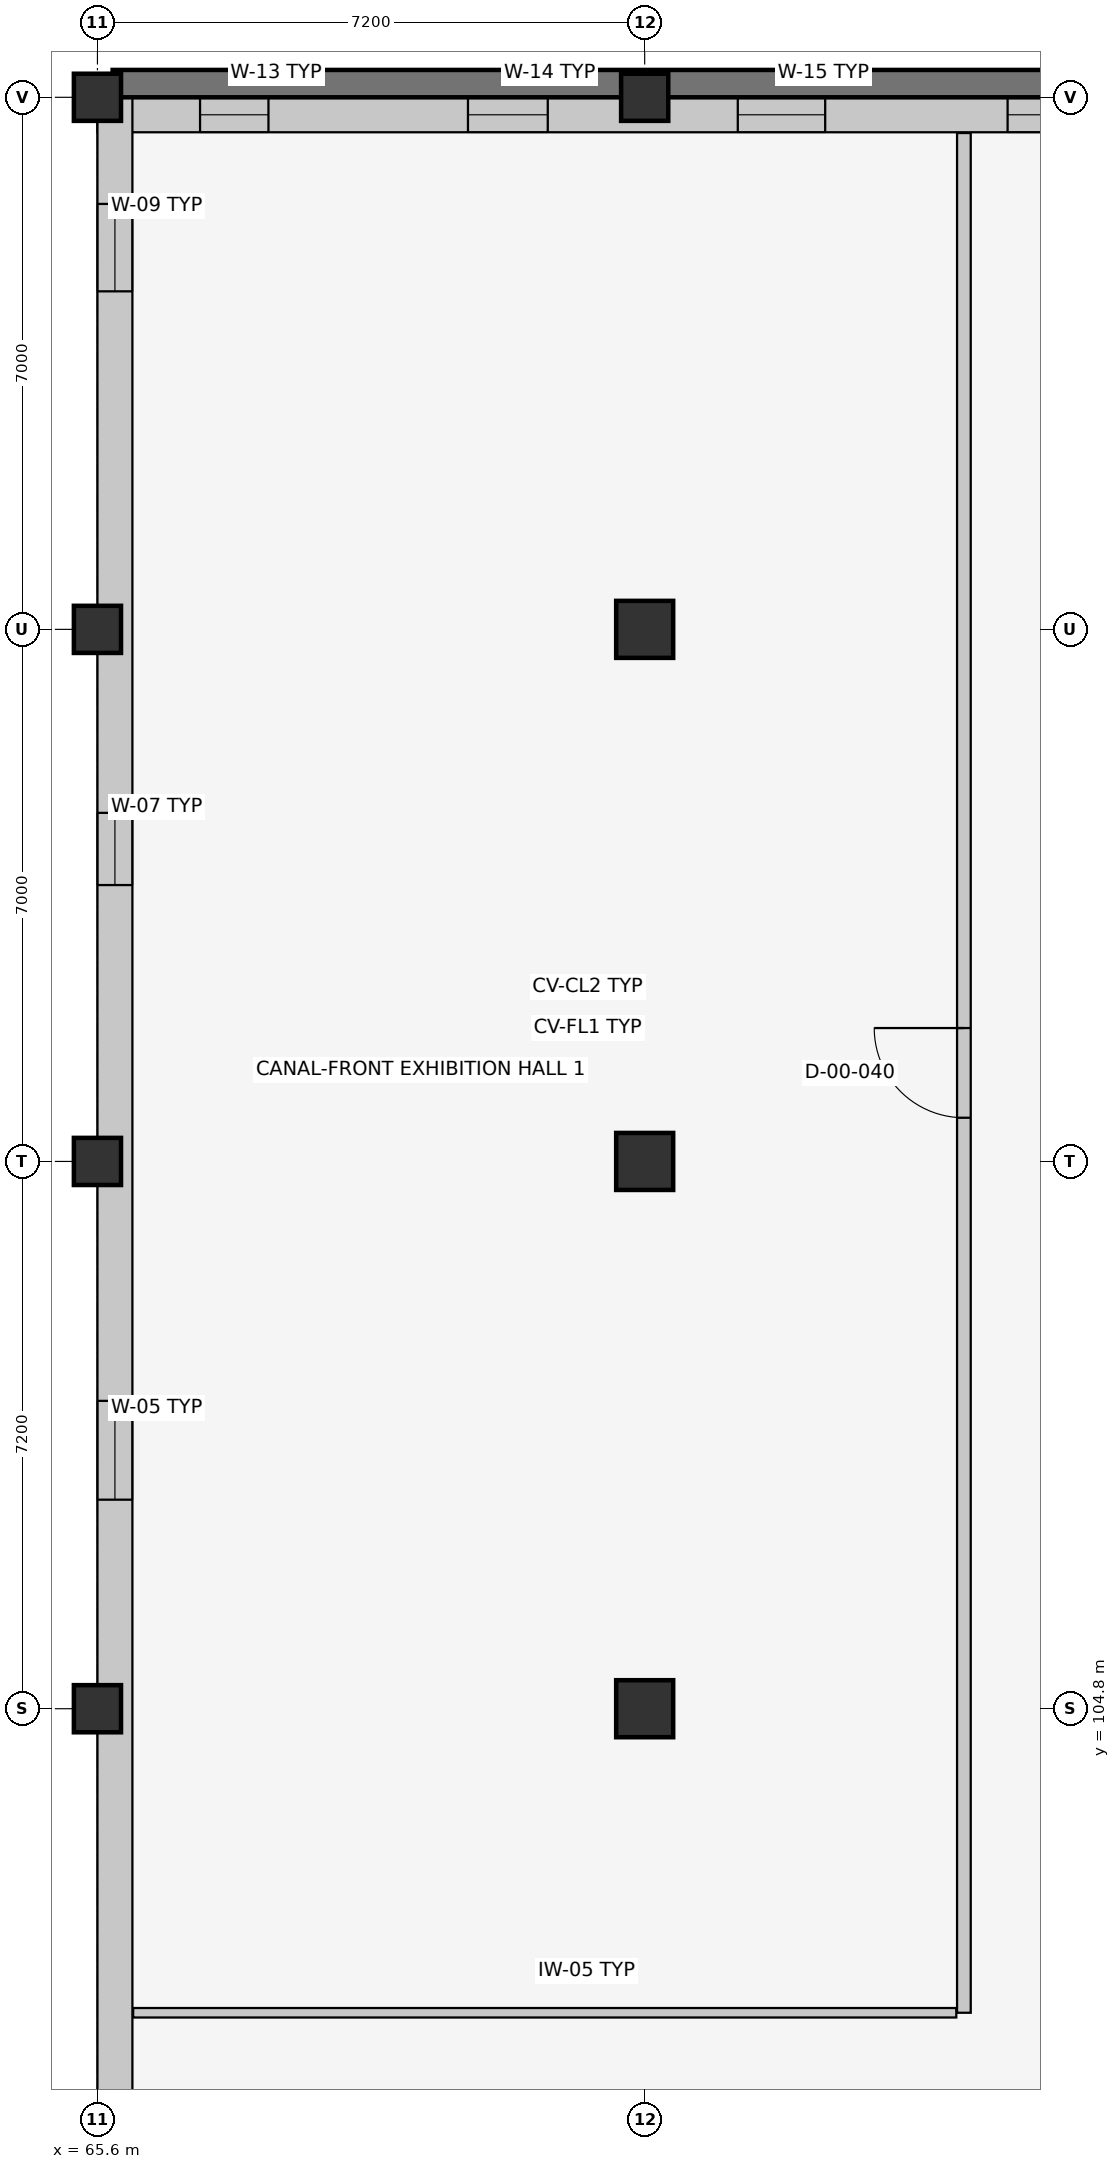
"""IFC4 building model, lengths in metres.
Left out: names, types, materials, properties, quantities, classifications, styles, units other than length and angle.
Written with IfcOpenShell. Run it as: python <this file> out.ifc"""

import sys

from ifc_helpers import new_model, si_unit, direction, frame, frame_2d, origin, origin_2d, place, context, subcontext, project, spatial, rectangle, circle, extrude, element, fill, save


model = new_model("IFC4")
c1 = context("Model", 3, precision=1e-05, world=origin(), true_north=direction((0.0, 1.0)))
c2 = subcontext(c1, "Body", "Model", "MODEL_VIEW")
j1 = project(units=[si_unit("LENGTHUNIT", "METRE"), si_unit("PLANEANGLEUNIT", "RADIAN")], contexts=[c1])
p1 = place(None, origin())
s1 = spatial("IfcSite", under=j1, at=p1, CompositionType="ELEMENT")
p2 = place(p1, origin())
s2 = spatial("IfcBuilding", under=s1, at=p2, CompositionType="ELEMENT")
p3 = place(p2, origin())
s3 = spatial("IfcBuildingStorey", under=s2, at=p3, CompositionType="ELEMENT", Elevation=0.0)
for number, where, z_axis, x_axis in (
    (1, (65.6, 104.8, 0.0), (0.0, 0.0, 1.0), (1.0, 0.0, 0.0)),
    (2, (65.6, 112.0, 0.0), (0.0, 0.0, 1.0), (1.0, 0.0, 0.0)),
    (3, (65.6, 119.0, 0.0), (0.0, 0.0, 1.0), (1.0, 0.0, 0.0)),
    (4, (65.6, 126.0, 0.0), (0.0, 0.0, 1.0), (1.0, 0.0, 0.0)),
):
    element("IfcColumn", number, at=place(p3, frame(where, z_axis=z_axis, x_axis=x_axis)), inside=s3, PredefinedType="COLUMN", context=c2, shape_type="SweptSolid", body=[
        extrude(rectangle(XDim=0.62, YDim=0.62, at=origin_2d()), origin(), (0.0, 0.0, 1.0), 5.4),
    ])
for number, where, z_axis, x_axis in (
    (5, (72.8, 104.8, 0.0), (0.0, 0.0, 1.0), (1.0, 0.0, 0.0)),
    (6, (72.8, 112.0, 0.0), (0.0, 0.0, 1.0), (1.0, 0.0, 0.0)),
    (7, (72.8, 119.0, 0.0), (0.0, 0.0, 1.0), (1.0, 0.0, 0.0)),
):
    element("IfcColumn", number, at=place(p3, frame(where, z_axis=z_axis, x_axis=x_axis)), inside=s3, PredefinedType="COLUMN", context=c2, shape_type="SweptSolid", body=[
        extrude(circle(Radius=0.375, at=origin_2d()), origin(), (0.0, 0.0, 1.0), 5.4),
    ])
p4 = place(p3, frame((72.8, 126.0, 0.0), z_axis=(0.0, 0.0, 1.0), x_axis=(1.0, 0.0, 0.0)))
e8 = element("IfcColumn", 8, at=p4, inside=s3, PredefinedType="COLUMN", context=c2, shape_type="SweptSolid", body=[
    extrude(rectangle(XDim=0.62, YDim=0.62, at=origin_2d()), origin(), (0.0, 0.0, 1.0), 5.4),
])
p5 = place(p3, frame((65.6, 125.77, 0.0), z_axis=(0.0, 0.0, 1.0), x_axis=(1.0, 0.0, 0.0)))
e9 = element("IfcWall", 9, at=p5, inside=s3, PredefinedType="SOLIDWALL", context=c2, shape_type="SweptSolid", body=[
    extrude(rectangle(XDim=43.2, YDim=0.46, at=frame_2d((21.6, 0.0))), origin(), (0.0, 0.0, 1.0), 4.455),
])
p6 = place(p5, frame((16.9, 0.0, 0.0)))
e10 = element("IfcOpeningElement", 10, at=p6, cuts=e9, PredefinedType="OPENING", context=c2, shape_type="SweptSolid", body=[
    extrude(rectangle(XDim=2.2, YDim=2.4, at=frame_2d((1.1, 1.2))), frame((0.0, 0.242, 0.0), z_axis=(0.0, -1.0, 0.0), x_axis=(1.0, 0.0, 0.0)), (0.0, 0.0, 1.0), 0.484),
])
p7 = place(p5, frame((1.35, 0.0, 0.9)))
e11 = element("IfcOpeningElement", 11, at=p7, cuts=e9, PredefinedType="OPENING", context=c2, shape_type="SweptSolid", body=[
    extrude(rectangle(XDim=0.9, YDim=1.6, at=frame_2d((0.45, 0.8))), frame((0.0, 0.242, 0.0), z_axis=(0.0, -1.0, 0.0), x_axis=(1.0, 0.0, 0.0)), (0.0, 0.0, 1.0), 0.484),
])
p8 = place(p5, frame((4.875, 0.0, 0.9)))
e12 = element("IfcOpeningElement", 12, at=p8, cuts=e9, PredefinedType="OPENING", context=c2, shape_type="SweptSolid", body=[
    extrude(rectangle(XDim=1.05, YDim=1.6, at=frame_2d((0.525, 0.8))), frame((0.0, 0.242, 0.0), z_axis=(0.0, -1.0, 0.0), x_axis=(1.0, 0.0, 0.0)), (0.0, 0.0, 1.0), 0.484),
])
p9 = place(p5, frame((8.425, 0.0, 0.9)))
e13 = element("IfcOpeningElement", 13, at=p9, cuts=e9, PredefinedType="OPENING", context=c2, shape_type="SweptSolid", body=[
    extrude(rectangle(XDim=1.15, YDim=1.6, at=frame_2d((0.575, 0.8))), frame((0.0, 0.242, 0.0), z_axis=(0.0, -1.0, 0.0), x_axis=(1.0, 0.0, 0.0)), (0.0, 0.0, 1.0), 0.484),
])
p10 = place(p5, frame((11.975, 0.0, 0.9)))
e14 = element("IfcOpeningElement", 14, at=p10, cuts=e9, PredefinedType="OPENING", context=c2, shape_type="SweptSolid", body=[
    extrude(rectangle(XDim=1.25, YDim=1.6, at=frame_2d((0.625, 0.8))), frame((0.0, 0.242, 0.0), z_axis=(0.0, -1.0, 0.0), x_axis=(1.0, 0.0, 0.0)), (0.0, 0.0, 1.0), 0.484),
])
p11 = place(p5, frame((22.9, 0.0, 0.9)))
e15 = element("IfcOpeningElement", 15, at=p11, cuts=e9, PredefinedType="OPENING", context=c2, shape_type="SweptSolid", body=[
    extrude(rectangle(XDim=1.0, YDim=1.75, at=frame_2d((0.5, 0.875))), frame((0.0, 0.242, 0.0), z_axis=(0.0, -1.0, 0.0), x_axis=(1.0, 0.0, 0.0)), (0.0, 0.0, 1.0), 0.484),
])
p12 = place(p5, frame((26.44, 0.0, 0.9)))
e16 = element("IfcOpeningElement", 16, at=p12, cuts=e9, PredefinedType="OPENING", context=c2, shape_type="SweptSolid", body=[
    extrude(rectangle(XDim=1.12, YDim=1.75, at=frame_2d((0.56, 0.875))), frame((0.0, 0.242, 0.0), z_axis=(0.0, -1.0, 0.0), x_axis=(1.0, 0.0, 0.0)), (0.0, 0.0, 1.0), 0.484),
])
p13 = place(p5, frame((29.98, 0.0, 0.9)))
e17 = element("IfcOpeningElement", 17, at=p13, cuts=e9, PredefinedType="OPENING", context=c2, shape_type="SweptSolid", body=[
    extrude(rectangle(XDim=1.24, YDim=1.75, at=frame_2d((0.62, 0.875))), frame((0.0, 0.242, 0.0), z_axis=(0.0, -1.0, 0.0), x_axis=(1.0, 0.0, 0.0)), (0.0, 0.0, 1.0), 0.484),
])
p14 = place(p5, frame((33.53, 0.0, 0.9)))
e18 = element("IfcOpeningElement", 18, at=p14, cuts=e9, PredefinedType="OPENING", context=c2, shape_type="SweptSolid", body=[
    extrude(rectangle(XDim=1.34, YDim=1.75, at=frame_2d((0.67, 0.875))), frame((0.0, 0.242, 0.0), z_axis=(0.0, -1.0, 0.0), x_axis=(1.0, 0.0, 0.0)), (0.0, 0.0, 1.0), 0.484),
])
p15 = place(p5, frame((37.08, 0.0, 0.9)))
e19 = element("IfcOpeningElement", 19, at=p15, cuts=e9, PredefinedType="OPENING", context=c2, shape_type="SweptSolid", body=[
    extrude(rectangle(XDim=1.44, YDim=1.75, at=frame_2d((0.72, 0.875))), frame((0.0, 0.242, 0.0), z_axis=(0.0, -1.0, 0.0), x_axis=(1.0, 0.0, 0.0)), (0.0, 0.0, 1.0), 0.484),
])
p16 = place(p5, frame((40.65, 0.0, 0.9)))
e20 = element("IfcOpeningElement", 20, at=p16, cuts=e9, PredefinedType="OPENING", context=c2, shape_type="SweptSolid", body=[
    extrude(rectangle(XDim=1.5, YDim=1.75, at=frame_2d((0.75, 0.875))), frame((0.0, 0.242, 0.0), z_axis=(0.0, -1.0, 0.0), x_axis=(1.0, 0.0, 0.0)), (0.0, 0.0, 1.0), 0.484),
])
p17 = place(p3, frame((65.83, 90.4, 0.0), z_axis=(0.0, 0.0, 1.0), x_axis=(0.0, 1.0, 0.0)))
e21 = element("IfcWall", 21, at=p17, inside=s3, PredefinedType="SOLIDWALL", context=c2, shape_type="SweptSolid", body=[
    extrude(rectangle(XDim=35.6, YDim=0.46, at=frame_2d((17.8, 0.0))), origin(), (0.0, 0.0, 1.0), 4.515),
])
p18 = place(p17, frame((2.7, 0.0, 0.0)))
e22 = element("IfcOpeningElement", 22, at=p18, cuts=e21, PredefinedType="OPENING", context=c2, shape_type="SweptSolid", body=[
    extrude(rectangle(XDim=1.8, YDim=2.3, at=frame_2d((0.9, 1.15))), frame((0.0, 0.242, 0.0), z_axis=(0.0, -1.0, 0.0), x_axis=(1.0, 0.0, 0.0)), (0.0, 0.0, 1.0), 0.484),
])
p19 = place(p17, frame((17.15, 0.0, 0.9)))
e23 = element("IfcOpeningElement", 23, at=p19, cuts=e21, PredefinedType="OPENING", context=c2, shape_type="SweptSolid", body=[
    extrude(rectangle(XDim=1.3, YDim=1.35, at=frame_2d((0.65, 0.675))), frame((0.0, 0.242, 0.0), z_axis=(0.0, -1.0, 0.0), x_axis=(1.0, 0.0, 0.0)), (0.0, 0.0, 1.0), 0.484),
])
p20 = place(p17, frame((25.236, 0.0, 0.9)))
e24 = element("IfcOpeningElement", 24, at=p20, cuts=e21, PredefinedType="OPENING", context=c2, shape_type="SweptSolid", body=[
    extrude(rectangle(XDim=0.95, YDim=1.45, at=frame_2d((0.475, 0.725))), frame((0.0, 0.242, 0.0), z_axis=(0.0, -1.0, 0.0), x_axis=(1.0, 0.0, 0.0)), (0.0, 0.0, 1.0), 0.484),
])
p21 = place(p17, frame((33.047, 0.0, 0.9)))
e25 = element("IfcOpeningElement", 25, at=p21, cuts=e21, PredefinedType="OPENING", context=c2, shape_type="SweptSolid", body=[
    extrude(rectangle(XDim=1.15, YDim=1.45, at=frame_2d((0.575, 0.725))), frame((0.0, 0.242, 0.0), z_axis=(0.0, -1.0, 0.0), x_axis=(1.0, 0.0, 0.0)), (0.0, 0.0, 1.0), 0.484),
])
p22 = place(p3, frame((65.8, 126.18, -0.8), z_axis=(0.0, 0.0, 1.0), x_axis=(1.0, 0.0, 0.0)))
e26 = element("IfcWall", 26, at=p22, inside=s3, PredefinedType="USERDEFINED", context=c2, shape_type="SweptSolid", body=[
    extrude(rectangle(XDim=21.4, YDim=0.36, at=frame_2d((10.7, 0.0))), origin(), (0.0, 0.0, 1.0), 1.35),
])
p23 = place(p3, frame((77.0, 100.8, 0.0), z_axis=(0.0, 0.0, 1.0), x_axis=(0.0, 1.0, 0.0)))
e27 = element("IfcWall", 27, at=p23, inside=s3, PredefinedType="PARTITIONING", context=c2, shape_type="SweptSolid", body=[
    extrude(rectangle(XDim=24.73, YDim=0.18, at=frame_2d((12.365, 0.0))), origin(), (0.0, 0.0, 1.0), 5.12),
])
p24 = place(p23, frame((11.775, 0.0, 0.0)))
e28 = element("IfcOpeningElement", 28, at=p24, cuts=e27, PredefinedType="OPENING", context=c2, shape_type="SweptSolid", body=[
    extrude(rectangle(XDim=1.18, YDim=2.2, at=frame_2d((0.59, 1.1))), frame((0.0, 0.102, 0.0), z_axis=(0.0, -1.0, 0.0), x_axis=(1.0, 0.0, 0.0)), (0.0, 0.0, 1.0), 0.204),
])
p25 = place(p3, frame((66.07, 100.8, 0.0), z_axis=(0.0, 0.0, 1.0), x_axis=(1.0, 0.0, 0.0)))
e29 = element("IfcWall", 29, at=p25, inside=s3, PredefinedType="PARTITIONING", context=c2, shape_type="SweptSolid", body=[
    extrude(rectangle(XDim=10.83, YDim=0.125, at=frame_2d((5.415, 0.0))), origin(), (0.0, 0.0, 1.0), 5.12),
])
p26 = place(p7, origin())
e30 = element("IfcWindow", 30, at=p26, inside=s3, PartitioningType="SINGLE_PANEL", PredefinedType="WINDOW", context=c2, shape_type="SweptSolid", body=[
    extrude(rectangle(XDim=0.9, YDim=1.6, at=frame_2d((0.45, 0.8))), frame((0.0, 0.03, 0.0), z_axis=(0.0, -1.0, 0.0), x_axis=(1.0, 0.0, 0.0)), (0.0, 0.0, 1.0), 0.06),
])
fill(e11, e30)
p27 = place(p8, origin())
e31 = element("IfcWindow", 31, at=p27, inside=s3, PartitioningType="SINGLE_PANEL", PredefinedType="WINDOW", context=c2, shape_type="SweptSolid", body=[
    extrude(rectangle(XDim=1.05, YDim=1.6, at=frame_2d((0.525, 0.8))), frame((0.0, 0.03, 0.0), z_axis=(0.0, -1.0, 0.0), x_axis=(1.0, 0.0, 0.0)), (0.0, 0.0, 1.0), 0.06),
])
fill(e12, e31)
p28 = place(p9, origin())
e32 = element("IfcWindow", 32, at=p28, inside=s3, PartitioningType="SINGLE_PANEL", PredefinedType="WINDOW", context=c2, shape_type="SweptSolid", body=[
    extrude(rectangle(XDim=1.15, YDim=1.6, at=frame_2d((0.575, 0.8))), frame((0.0, 0.03, 0.0), z_axis=(0.0, -1.0, 0.0), x_axis=(1.0, 0.0, 0.0)), (0.0, 0.0, 1.0), 0.06),
])
fill(e13, e32)
p29 = place(p10, origin())
e33 = element("IfcWindow", 33, at=p29, inside=s3, PartitioningType="SINGLE_PANEL", PredefinedType="WINDOW", context=c2, shape_type="SweptSolid", body=[
    extrude(rectangle(XDim=1.25, YDim=1.6, at=frame_2d((0.625, 0.8))), frame((0.0, 0.03, 0.0), z_axis=(0.0, -1.0, 0.0), x_axis=(1.0, 0.0, 0.0)), (0.0, 0.0, 1.0), 0.06),
])
fill(e14, e33)
p30 = place(p19, origin())
e34 = element("IfcWindow", 34, at=p30, inside=s3, PartitioningType="SINGLE_PANEL", PredefinedType="WINDOW", context=c2, shape_type="SweptSolid", body=[
    extrude(rectangle(XDim=1.3, YDim=1.35, at=frame_2d((0.65, 0.675))), frame((0.0, 0.03, 0.0), z_axis=(0.0, -1.0, 0.0), x_axis=(1.0, 0.0, 0.0)), (0.0, 0.0, 1.0), 0.06),
])
fill(e23, e34)
p31 = place(p20, origin())
e35 = element("IfcWindow", 35, at=p31, inside=s3, PartitioningType="SINGLE_PANEL", PredefinedType="WINDOW", context=c2, shape_type="SweptSolid", body=[
    extrude(rectangle(XDim=0.95, YDim=1.45, at=frame_2d((0.475, 0.725))), frame((0.0, 0.03, 0.0), z_axis=(0.0, -1.0, 0.0), x_axis=(1.0, 0.0, 0.0)), (0.0, 0.0, 1.0), 0.06),
])
fill(e24, e35)
p32 = place(p21, origin())
e36 = element("IfcWindow", 36, at=p32, inside=s3, PartitioningType="SINGLE_PANEL", PredefinedType="WINDOW", context=c2, shape_type="SweptSolid", body=[
    extrude(rectangle(XDim=1.15, YDim=1.45, at=frame_2d((0.575, 0.725))), frame((0.0, 0.03, 0.0), z_axis=(0.0, -1.0, 0.0), x_axis=(1.0, 0.0, 0.0)), (0.0, 0.0, 1.0), 0.06),
])
fill(e25, e36)
p33 = place(p24, origin())
e37 = element("IfcDoor", 37, at=p33, inside=s3, OperationType="SINGLE_SWING_RIGHT", PredefinedType="DOOR", context=c2, shape_type="SweptSolid", body=[
    extrude(rectangle(XDim=1.18, YDim=2.2, at=frame_2d((0.59, 1.1))), frame((0.0, 0.025, 0.0), z_axis=(0.0, -1.0, 0.0), x_axis=(1.0, 0.0, 0.0)), (0.0, 0.0, 1.0), 0.05),
])
fill(e28, e37)
save(model, sys.argv[1])
